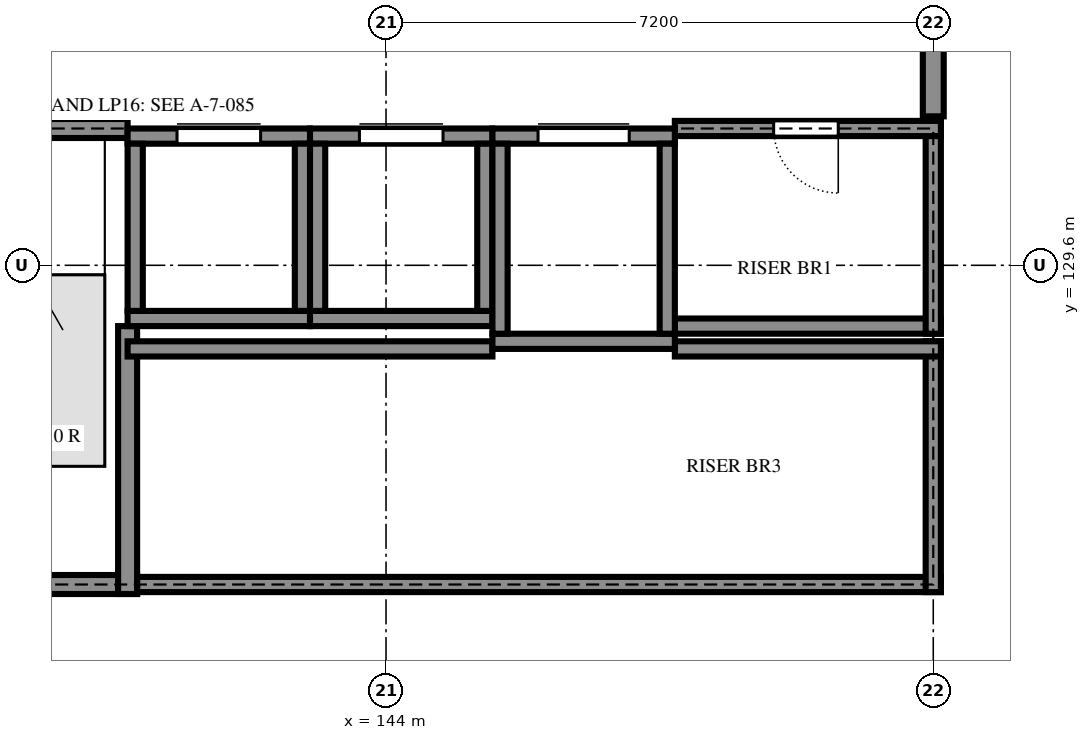
"""IFC4 building model, lengths in metres.
Left out: names, types, materials, properties, quantities, classifications, styles, units other than length and angle.
Written with IfcOpenShell. Run it as: python <this file> out.ifc"""

import sys

from ifc_helpers import new_model, si_unit, direction, frame, frame_2d, origin, place, context, subcontext, project, spatial, rectangle, extrude, element, fill, save


model = new_model("IFC4")
c1 = context("Model", 3, precision=1e-05, world=origin(), true_north=direction((0.0, 1.0)))
c2 = subcontext(c1, "Body", "Model", "MODEL_VIEW")
j1 = project(units=[si_unit("LENGTHUNIT", "METRE"), si_unit("PLANEANGLEUNIT", "RADIAN")], contexts=[c1])
p1 = place(None, origin())
s1 = spatial("IfcSite", under=j1, at=p1, CompositionType="ELEMENT")
p2 = place(p1, origin())
s2 = spatial("IfcBuilding", under=s1, at=p2, CompositionType="ELEMENT")
p3 = place(p2, frame((0.0, 0.0, 7.2)))
s3 = spatial("IfcBuildingStorey", under=s2, at=p3, CompositionType="ELEMENT", Elevation=7.2)
p4 = place(p3, frame((136.675, 125.4, 0.0), z_axis=(0.0, 0.0, 1.0), x_axis=(1.0, 0.0, 0.0)))
e1 = element("IfcWall", 1, at=p4, inside=s3, PredefinedType="SHEAR", context=c2, shape_type="SweptSolid", body=[
    extrude(rectangle(XDim=4.05, YDim=0.25, at=frame_2d((2.025, 0.0))), origin(), (0.0, 0.0, 1.0), 3.6),
])
p5 = place(p4, frame((1.375, 0.0, 0.0)))
e2 = element("IfcOpeningElement", 2, at=p5, cuts=e1, PredefinedType="OPENING", context=c2, shape_type="SweptSolid", body=[
    extrude(rectangle(XDim=1.2, YDim=2.4, at=frame_2d((0.6, 1.2))), frame((0.0, 0.135, 0.0), z_axis=(0.0, -1.0, 0.0), x_axis=(1.0, 0.0, 0.0)), (0.0, 0.0, 1.0), 0.27),
])
p6 = place(p3, frame((140.725, 125.4, 0.0), z_axis=(0.0, 0.0, 1.0), x_axis=(1.0, 0.0, 0.0)))
e3 = element("IfcWall", 3, at=p6, inside=s3, PredefinedType="SHEAR", context=c2, shape_type="SweptSolid", body=[
    extrude(rectangle(XDim=10.575, YDim=0.2, at=frame_2d((5.288, 0.0))), origin(), (0.0, 0.0, 1.0), 3.6),
])
p7 = place(p6, frame((4.85, 0.0, 0.0)))
e4 = element("IfcOpeningElement", 4, at=p7, cuts=e3, PredefinedType="OPENING", context=c2, shape_type="SweptSolid", body=[
    extrude(rectangle(XDim=0.85, YDim=2.1, at=frame_2d((0.425, 1.05))), frame((0.0, 0.11, 0.0), z_axis=(0.0, -1.0, 0.0), x_axis=(1.0, 0.0, 0.0)), (0.0, 0.0, 1.0), 0.22),
])
p8 = place(p3, frame((140.6, 125.275, 0.0), z_axis=(0.0, 0.0, 1.0), x_axis=(0.0, 1.0, 0.0)))
e5 = element("IfcWall", 5, at=p8, inside=s3, PredefinedType="SHEAR", context=c2, shape_type="SweptSolid", body=[
    extrude(rectangle(XDim=3.525, YDim=0.25, at=frame_2d((1.763, 0.0))), origin(), (0.0, 0.0, 1.0), 3.6),
])
p9 = place(p3, frame((151.2, 125.3, 0.0), z_axis=(0.0, 0.0, 1.0), x_axis=(0.0, 1.0, 0.0)))
e6 = element("IfcWall", 6, at=p9, inside=s3, PredefinedType="SHEAR", context=c2, shape_type="SweptSolid", body=[
    extrude(rectangle(XDim=3.3, YDim=0.2, at=frame_2d((1.65, 0.0))), origin(), (0.0, 0.0, 1.0), 3.6),
])
p10 = place(p3, frame((140.6, 128.5, 0.0), z_axis=(0.0, 0.0, 1.0), x_axis=(1.0, 0.0, 0.0)))
e7 = element("IfcWall", 7, at=p10, inside=s3, PredefinedType="SHEAR", context=c2, shape_type="SweptSolid", body=[
    extrude(rectangle(XDim=4.8, YDim=0.2, at=frame_2d((2.4, 0.0))), origin(), (0.0, 0.0, 1.0), 3.6),
])
for number, where, z_axis, x_axis in (
    (8, (147.8, 128.5, 0.0), (0.0, 0.0, 1.0), (1.0, 0.0, 0.0)),
    (9, (147.8, 128.8, 0.0), (0.0, 0.0, 1.0), (1.0, 0.0, 0.0)),
):
    element("IfcWall", number, at=place(p3, frame(where, z_axis=z_axis, x_axis=x_axis)), inside=s3, PredefinedType="SHEAR", context=c2, shape_type="SweptSolid", body=[
        extrude(rectangle(XDim=3.5, YDim=0.2, at=frame_2d((1.75, 0.0))), origin(), (0.0, 0.0, 1.0), 3.6),
    ])
p11 = place(p3, frame((151.2, 128.7, 0.0), z_axis=(0.0, 0.0, 1.0), x_axis=(0.0, 1.0, 0.0)))
e10 = element("IfcWall", 10, at=p11, inside=s3, PredefinedType="SHEAR", context=c2, shape_type="SweptSolid", body=[
    extrude(rectangle(XDim=2.8, YDim=0.2, at=frame_2d((1.4, 0.0))), origin(), (0.0, 0.0, 1.0), 3.6),
])
p12 = place(p3, frame((140.6, 131.4, 0.0), z_axis=(0.0, 0.0, 1.0), x_axis=(-1.0, 0.0, 0.0)))
e11 = element("IfcWall", 11, at=p12, inside=s3, PredefinedType="SHEAR", context=c2, shape_type="SweptSolid", body=[
    extrude(rectangle(XDim=3.925, YDim=0.25, at=frame_2d((1.962, 0.0))), origin(), (0.0, 0.0, 1.0), 3.6),
])
p13 = place(p3, frame((151.3, 131.4, 0.0), z_axis=(0.0, 0.0, 1.0), x_axis=(-1.0, 0.0, 0.0)))
e12 = element("IfcWall", 12, at=p13, inside=s3, PredefinedType="SHEAR", context=c2, shape_type="SweptSolid", body=[
    extrude(rectangle(XDim=3.5, YDim=0.2, at=frame_2d((1.75, 0.0))), origin(), (0.0, 0.0, 1.0), 3.6),
])
p14 = place(p13, frame((1.35, 0.0, 0.0)))
e13 = element("IfcOpeningElement", 13, at=p14, cuts=e12, PredefinedType="OPENING", context=c2, shape_type="SweptSolid", body=[
    extrude(rectangle(XDim=0.85, YDim=2.1, at=frame_2d((0.425, 1.05))), frame((0.0, 0.11, 0.0), z_axis=(0.0, -1.0, 0.0), x_axis=(1.0, 0.0, 0.0)), (0.0, 0.0, 1.0), 0.22),
])
p15 = place(p3, frame((140.6, 128.9, 0.0), z_axis=(0.0, 0.0, 1.0), x_axis=(1.0, 0.0, 0.0)))
e14 = element("IfcWall", 14, at=p15, inside=s3, PredefinedType="SHEAR", context=c2, shape_type="SweptSolid", body=[
    extrude(rectangle(XDim=2.4, YDim=0.2, at=frame_2d((1.2, 0.0))), origin(), (0.0, 0.0, 1.0), 3.6),
])
p16 = place(p3, frame((140.6, 131.3, 0.0), z_axis=(0.0, 0.0, 1.0), x_axis=(1.0, 0.0, 0.0)))
e15 = element("IfcWall", 15, at=p16, inside=s3, PredefinedType="SHEAR", context=c2, shape_type="SweptSolid", body=[
    extrude(rectangle(XDim=2.4, YDim=0.2, at=frame_2d((1.2, 0.0))), origin(), (0.0, 0.0, 1.0), 3.6),
])
p17 = place(p16, frame((0.65, 0.0, 0.0)))
e16 = element("IfcOpeningElement", 16, at=p17, cuts=e15, PredefinedType="OPENING", context=c2, shape_type="SweptSolid", body=[
    extrude(rectangle(XDim=1.1, YDim=2.1, at=frame_2d((0.55, 1.05))), frame((0.0, 0.11, 0.0), z_axis=(0.0, -1.0, 0.0), x_axis=(1.0, 0.0, 0.0)), (0.0, 0.0, 1.0), 0.22),
])
for number, where, z_axis, x_axis in (
    (17, (140.7, 129.0, 0.0), (0.0, 0.0, 1.0), (0.0, 1.0, 0.0)),
    (18, (142.9, 129.0, 0.0), (0.0, 0.0, 1.0), (0.0, 1.0, 0.0)),
):
    element("IfcWall", number, at=place(p3, frame(where, z_axis=z_axis, x_axis=x_axis)), inside=s3, PredefinedType="SHEAR", context=c2, shape_type="SweptSolid", body=[
        extrude(rectangle(XDim=2.2, YDim=0.2, at=frame_2d((1.1, 0.0))), origin(), (0.0, 0.0, 1.0), 3.6),
    ])
p18 = place(p3, frame((143.0, 128.9, 0.0), z_axis=(0.0, 0.0, 1.0), x_axis=(1.0, 0.0, 0.0)))
e19 = element("IfcWall", 19, at=p18, inside=s3, PredefinedType="SHEAR", context=c2, shape_type="SweptSolid", body=[
    extrude(rectangle(XDim=2.4, YDim=0.2, at=frame_2d((1.2, 0.0))), origin(), (0.0, 0.0, 1.0), 3.6),
])
p19 = place(p3, frame((143.0, 131.3, 0.0), z_axis=(0.0, 0.0, 1.0), x_axis=(1.0, 0.0, 0.0)))
e20 = element("IfcWall", 20, at=p19, inside=s3, PredefinedType="SHEAR", context=c2, shape_type="SweptSolid", body=[
    extrude(rectangle(XDim=2.4, YDim=0.2, at=frame_2d((1.2, 0.0))), origin(), (0.0, 0.0, 1.0), 3.6),
])
p20 = place(p19, frame((0.65, 0.0, 0.0)))
e21 = element("IfcOpeningElement", 21, at=p20, cuts=e20, PredefinedType="OPENING", context=c2, shape_type="SweptSolid", body=[
    extrude(rectangle(XDim=1.1, YDim=2.1, at=frame_2d((0.55, 1.05))), frame((0.0, 0.11, 0.0), z_axis=(0.0, -1.0, 0.0), x_axis=(1.0, 0.0, 0.0)), (0.0, 0.0, 1.0), 0.22),
])
for number, where, z_axis, x_axis in (
    (22, (143.1, 129.0, 0.0), (0.0, 0.0, 1.0), (0.0, 1.0, 0.0)),
    (23, (145.3, 129.0, 0.0), (0.0, 0.0, 1.0), (0.0, 1.0, 0.0)),
):
    element("IfcWall", number, at=place(p3, frame(where, z_axis=z_axis, x_axis=x_axis)), inside=s3, PredefinedType="SHEAR", context=c2, shape_type="SweptSolid", body=[
        extrude(rectangle(XDim=2.2, YDim=0.2, at=frame_2d((1.1, 0.0))), origin(), (0.0, 0.0, 1.0), 3.6),
    ])
p21 = place(p3, frame((145.4, 128.6, 0.0), z_axis=(0.0, 0.0, 1.0), x_axis=(1.0, 0.0, 0.0)))
e24 = element("IfcWall", 24, at=p21, inside=s3, PredefinedType="SHEAR", context=c2, shape_type="SweptSolid", body=[
    extrude(rectangle(XDim=2.4, YDim=0.2, at=frame_2d((1.2, 0.0))), origin(), (0.0, 0.0, 1.0), 3.6),
])
p22 = place(p3, frame((145.4, 131.3, 0.0), z_axis=(0.0, 0.0, 1.0), x_axis=(1.0, 0.0, 0.0)))
e25 = element("IfcWall", 25, at=p22, inside=s3, PredefinedType="SHEAR", context=c2, shape_type="SweptSolid", body=[
    extrude(rectangle(XDim=2.4, YDim=0.2, at=frame_2d((1.2, 0.0))), origin(), (0.0, 0.0, 1.0), 3.6),
])
p23 = place(p22, frame((0.6, 0.0, 0.0)))
e26 = element("IfcOpeningElement", 26, at=p23, cuts=e25, PredefinedType="OPENING", context=c2, shape_type="SweptSolid", body=[
    extrude(rectangle(XDim=1.2, YDim=2.1, at=frame_2d((0.6, 1.05))), frame((0.0, 0.11, 0.0), z_axis=(0.0, -1.0, 0.0), x_axis=(1.0, 0.0, 0.0)), (0.0, 0.0, 1.0), 0.22),
])
for number, where, z_axis, x_axis in (
    (27, (145.5, 128.7, 0.0), (0.0, 0.0, 1.0), (0.0, 1.0, 0.0)),
    (28, (147.7, 128.7, 0.0), (0.0, 0.0, 1.0), (0.0, 1.0, 0.0)),
):
    element("IfcWall", number, at=place(p3, frame(where, z_axis=z_axis, x_axis=x_axis)), inside=s3, PredefinedType="SHEAR", context=c2, shape_type="SweptSolid", body=[
        extrude(rectangle(XDim=2.5, YDim=0.2, at=frame_2d((1.25, 0.0))), origin(), (0.0, 0.0, 1.0), 3.6),
    ])
p24 = place(p3, frame((151.2, 122.64, 0.0), z_axis=(0.0, 0.0, 1.0), x_axis=(0.0, 1.0, 0.0)))
e29 = element("IfcWall", 29, at=p24, inside=s3, PredefinedType="PARTITIONING", context=c2, shape_type="SweptSolid", body=[
    extrude(rectangle(XDim=2.6, YDim=0.275, at=frame_2d((1.3, 0.0))), origin(), (0.0, 0.0, 1.0), 3.6),
])
p25 = place(p3, frame((151.2, 136.65, 0.0), z_axis=(0.0, 0.0, 1.0), x_axis=(0.0, -1.0, 0.0)))
e30 = element("IfcWall", 30, at=p25, inside=s3, PredefinedType="PARTITIONING", context=c2, shape_type="SweptSolid", body=[
    extrude(rectangle(XDim=5.09, YDim=0.275, at=frame_2d((2.545, 0.0))), origin(), (0.0, 0.0, 1.0), 3.6),
])
p26 = place(p25, frame((0.24, 0.0, 0.0)))
e31 = element("IfcOpeningElement", 31, at=p26, cuts=e30, PredefinedType="OPENING", context=c2, shape_type="SweptSolid", body=[
    extrude(rectangle(XDim=2.1, YDim=2.4, at=frame_2d((1.05, 1.2))), frame((0.0, 0.147, 0.0), z_axis=(0.0, -1.0, 0.0), x_axis=(1.0, 0.0, 0.0)), (0.0, 0.0, 1.0), 0.295),
])
p27 = place(p17, origin())
e32 = element("IfcDoor", 32, at=p27, inside=s3, OperationType="SLIDING_TO_LEFT", PredefinedType="DOOR", context=c2, shape_type="SweptSolid", body=[
    extrude(rectangle(XDim=1.1, YDim=2.1, at=frame_2d((0.55, 1.05))), frame((0.0, 0.025, 0.0), z_axis=(0.0, -1.0, 0.0), x_axis=(1.0, 0.0, 0.0)), (0.0, 0.0, 1.0), 0.05),
])
fill(e16, e32)
p28 = place(p20, origin())
e33 = element("IfcDoor", 33, at=p28, inside=s3, OperationType="SLIDING_TO_LEFT", PredefinedType="DOOR", context=c2, shape_type="SweptSolid", body=[
    extrude(rectangle(XDim=1.1, YDim=2.1, at=frame_2d((0.55, 1.05))), frame((0.0, 0.025, 0.0), z_axis=(0.0, -1.0, 0.0), x_axis=(1.0, 0.0, 0.0)), (0.0, 0.0, 1.0), 0.05),
])
fill(e21, e33)
p29 = place(p23, origin())
e34 = element("IfcDoor", 34, at=p29, inside=s3, OperationType="SLIDING_TO_LEFT", PredefinedType="DOOR", context=c2, shape_type="SweptSolid", body=[
    extrude(rectangle(XDim=1.2, YDim=2.1, at=frame_2d((0.6, 1.05))), frame((0.0, 0.025, 0.0), z_axis=(0.0, -1.0, 0.0), x_axis=(1.0, 0.0, 0.0)), (0.0, 0.0, 1.0), 0.05),
])
fill(e26, e34)
p30 = place(p14, origin())
e35 = element("IfcDoor", 35, at=p30, inside=s3, OperationType="SINGLE_SWING_RIGHT", PredefinedType="DOOR", context=c2, shape_type="SweptSolid", body=[
    extrude(rectangle(XDim=0.85, YDim=2.1, at=frame_2d((0.425, 1.05))), frame((0.0, 0.025, 0.0), z_axis=(0.0, -1.0, 0.0), x_axis=(1.0, 0.0, 0.0)), (0.0, 0.0, 1.0), 0.05),
])
fill(e13, e35)
p31 = place(p7, origin())
e36 = element("IfcDoor", 36, at=p31, inside=s3, OperationType="SINGLE_SWING_RIGHT", PredefinedType="DOOR", context=c2, shape_type="SweptSolid", body=[
    extrude(rectangle(XDim=0.85, YDim=2.1, at=frame_2d((0.425, 1.05))), frame((0.0, 0.025, 0.0), z_axis=(0.0, -1.0, 0.0), x_axis=(1.0, 0.0, 0.0)), (0.0, 0.0, 1.0), 0.05),
])
fill(e4, e36)
save(model, sys.argv[1])
